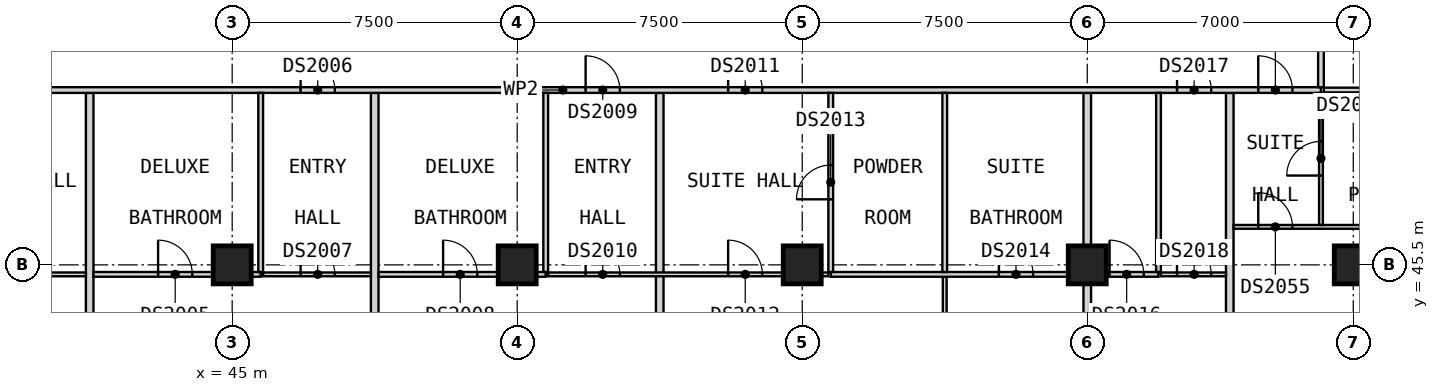
"""IFC4 building model, lengths in metres.
Left out: names, types, materials, properties, quantities, classifications, styles, units other than length and angle.
Written with IfcOpenShell. Run it as: python <this file> out.ifc"""

import sys

from ifc_helpers import new_model, si_unit, direction, frame, frame_2d, origin, origin_2d, place, context, subcontext, project, spatial, rectangle, extrude, element, fill, save


model = new_model("IFC4")
c1 = context("Model", 3, precision=1e-05, world=origin(), true_north=direction((0.0, 1.0)))
c2 = subcontext(c1, "Body", "Model", "MODEL_VIEW")
j1 = project(units=[si_unit("LENGTHUNIT", "METRE"), si_unit("PLANEANGLEUNIT", "RADIAN")], contexts=[c1])
p1 = place(None, origin())
s1 = spatial("IfcSite", under=j1, at=p1, CompositionType="ELEMENT")
p2 = place(p1, origin())
s2 = spatial("IfcBuilding", under=s1, at=p2, CompositionType="ELEMENT")
p3 = place(p2, frame((0.0, 0.0, 133.8)))
s3 = spatial("IfcBuildingStorey", under=s2, at=p3, CompositionType="ELEMENT", Elevation=133.8)
for number, where, z_axis, x_axis in (
    (1, (45.0, 45.5, 0.0), (0.0, 0.0, 1.0), (1.0, 0.0, 0.0)),
    (2, (52.5, 45.5, 0.0), (0.0, 0.0, 1.0), (1.0, 0.0, 0.0)),
    (3, (60.0, 45.5, 0.0), (0.0, 0.0, 1.0), (1.0, 0.0, 0.0)),
    (4, (67.5, 45.5, 0.0), (0.0, 0.0, 1.0), (1.0, 0.0, 0.0)),
    (5, (74.5, 45.5, 0.0), (0.0, 0.0, 1.0), (1.0, 0.0, 0.0)),
):
    element("IfcColumn", number, at=place(p3, frame(where, z_axis=z_axis, x_axis=x_axis)), inside=s3, PredefinedType="COLUMN", context=c2, shape_type="SweptSolid", body=[
        extrude(rectangle(XDim=1.0, YDim=1.0, at=origin_2d()), origin(), (0.0, 0.0, 1.0), 3.6),
    ])
for number, where, z_axis, x_axis in (
    (6, (41.25, 38.31, 0.0), (0.0, 0.0, 1.0), (0.0, 1.0, 0.0)),
    (7, (48.75, 38.31, 0.0), (0.0, 0.0, 1.0), (0.0, 1.0, 0.0)),
    (8, (56.25, 38.31, 0.0), (0.0, 0.0, 1.0), (0.0, 1.0, 0.0)),
):
    element("IfcWall", number, at=place(p3, frame(where, z_axis=z_axis, x_axis=x_axis)), inside=s3, PredefinedType="PARTITIONING", context=c2, shape_type="SweptSolid", body=[
        extrude(rectangle(XDim=11.715, YDim=0.2, at=frame_2d((5.857, 0.0))), origin(), (0.0, 0.0, 1.0), 3.35),
    ])
p4 = place(p3, frame((67.5, 37.5, 0.0), z_axis=(0.0, 0.0, 1.0), x_axis=(0.0, 1.0, 0.0)))
e9 = element("IfcWall", 9, at=p4, inside=s3, PredefinedType="PARTITIONING", context=c2, shape_type="SweptSolid", body=[
    extrude(rectangle(XDim=12.525, YDim=0.2, at=frame_2d((6.262, 0.0))), origin(), (0.0, 0.0, 1.0), 3.35),
])
p5 = place(p3, frame((71.25, 38.31, 0.0), z_axis=(0.0, 0.0, 1.0), x_axis=(0.0, 1.0, 0.0)))
e10 = element("IfcWall", 10, at=p5, inside=s3, PredefinedType="PARTITIONING", context=c2, shape_type="SweptSolid", body=[
    extrude(rectangle(XDim=11.715, YDim=0.2, at=frame_2d((5.857, 0.0))), origin(), (0.0, 0.0, 1.0), 3.35),
])
p6 = place(p3, frame((33.75, 50.1, 0.0), z_axis=(0.0, 0.0, 1.0), x_axis=(1.0, 0.0, 0.0)))
e11 = element("IfcWall", 11, at=p6, inside=s3, PredefinedType="PARTITIONING", context=c2, shape_type="SweptSolid", body=[
    extrude(rectangle(XDim=39.9, YDim=0.15, at=frame_2d((19.95, 0.0))), origin(), (0.0, 0.0, 1.0), 3.35),
])
p7 = place(p6, frame((5.175, 0.0, 0.0)))
e12 = element("IfcOpeningElement", 12, at=p7, cuts=e11, PredefinedType="OPENING", context=c2, shape_type="SweptSolid", body=[
    extrude(rectangle(XDim=0.9, YDim=2.1, at=frame_2d((0.45, 1.05))), frame((0.0, 0.085, 0.0), z_axis=(0.0, -1.0, 0.0), x_axis=(1.0, 0.0, 0.0)), (0.0, 0.0, 1.0), 0.17),
])
p8 = place(p6, frame((13.05, 0.0, 0.0)))
e13 = element("IfcOpeningElement", 13, at=p8, cuts=e11, PredefinedType="OPENING", context=c2, shape_type="SweptSolid", body=[
    extrude(rectangle(XDim=0.9, YDim=2.1, at=frame_2d((0.45, 1.05))), frame((0.0, 0.085, 0.0), z_axis=(0.0, -1.0, 0.0), x_axis=(1.0, 0.0, 0.0)), (0.0, 0.0, 1.0), 0.17),
])
p9 = place(p6, frame((20.55, 0.0, 0.0)))
e14 = element("IfcOpeningElement", 14, at=p9, cuts=e11, PredefinedType="OPENING", context=c2, shape_type="SweptSolid", body=[
    extrude(rectangle(XDim=0.9, YDim=2.1, at=frame_2d((0.45, 1.05))), frame((0.0, 0.085, 0.0), z_axis=(0.0, -1.0, 0.0), x_axis=(1.0, 0.0, 0.0)), (0.0, 0.0, 1.0), 0.17),
])
p10 = place(p6, frame((24.3, 0.0, 0.0)))
e15 = element("IfcOpeningElement", 15, at=p10, cuts=e11, PredefinedType="OPENING", context=c2, shape_type="SweptSolid", body=[
    extrude(rectangle(XDim=0.9, YDim=2.1, at=frame_2d((0.45, 1.05))), frame((0.0, 0.085, 0.0), z_axis=(0.0, -1.0, 0.0), x_axis=(1.0, 0.0, 0.0)), (0.0, 0.0, 1.0), 0.17),
])
p11 = place(p6, frame((36.113, 0.0, 0.0)))
e16 = element("IfcOpeningElement", 16, at=p11, cuts=e11, PredefinedType="OPENING", context=c2, shape_type="SweptSolid", body=[
    extrude(rectangle(XDim=0.9, YDim=2.1, at=frame_2d((0.45, 1.05))), frame((0.0, 0.085, 0.0), z_axis=(0.0, -1.0, 0.0), x_axis=(1.0, 0.0, 0.0)), (0.0, 0.0, 1.0), 0.17),
])
p12 = place(p6, frame((38.25, 0.0, 0.0)))
e17 = element("IfcOpeningElement", 17, at=p12, cuts=e11, PredefinedType="OPENING", context=c2, shape_type="SweptSolid", body=[
    extrude(rectangle(XDim=0.9, YDim=2.1, at=frame_2d((0.45, 1.05))), frame((0.0, 0.085, 0.0), z_axis=(0.0, -1.0, 0.0), x_axis=(1.0, 0.0, 0.0)), (0.0, 0.0, 1.0), 0.17),
])
p13 = place(p3, frame((73.65, 50.175, 0.0), z_axis=(0.0, 0.0, 1.0), x_axis=(0.0, 1.0, 0.0)))
e18 = element("IfcWall", 18, at=p13, inside=s3, PredefinedType="PARTITIONING", context=c2, shape_type="SweptSolid", body=[
    extrude(rectangle(XDim=38.4, YDim=0.15, at=frame_2d((19.2, 0.0))), origin(), (0.0, 0.0, 1.0), 3.35),
])
p14 = place(p13, frame((7.875, 0.0, 0.0)))
e19 = element("IfcOpeningElement", 19, at=p14, cuts=e18, PredefinedType="OPENING", context=c2, shape_type="SweptSolid", body=[
    extrude(rectangle(XDim=0.9, YDim=2.1, at=frame_2d((0.45, 1.05))), frame((0.0, 0.085, 0.0), z_axis=(0.0, -1.0, 0.0), x_axis=(1.0, 0.0, 0.0)), (0.0, 0.0, 1.0), 0.17),
])
p15 = place(p13, frame((12.188, 0.0, 0.0)))
e20 = element("IfcOpeningElement", 20, at=p15, cuts=e18, PredefinedType="OPENING", context=c2, shape_type="SweptSolid", body=[
    extrude(rectangle(XDim=0.9, YDim=2.1, at=frame_2d((0.45, 1.05))), frame((0.0, 0.085, 0.0), z_axis=(0.0, -1.0, 0.0), x_axis=(1.0, 0.0, 0.0)), (0.0, 0.0, 1.0), 0.17),
])
p16 = place(p13, frame((15.375, 0.0, 0.0)))
e21 = element("IfcOpeningElement", 21, at=p16, cuts=e18, PredefinedType="OPENING", context=c2, shape_type="SweptSolid", body=[
    extrude(rectangle(XDim=0.9, YDim=2.1, at=frame_2d((0.45, 1.05))), frame((0.0, 0.085, 0.0), z_axis=(0.0, -1.0, 0.0), x_axis=(1.0, 0.0, 0.0)), (0.0, 0.0, 1.0), 0.17),
])
p17 = place(p13, frame((30.375, 0.0, 0.0)))
e22 = element("IfcOpeningElement", 22, at=p17, cuts=e18, PredefinedType="OPENING", context=c2, shape_type="SweptSolid", body=[
    extrude(rectangle(XDim=0.9, YDim=2.1, at=frame_2d((0.45, 1.05))), frame((0.0, 0.085, 0.0), z_axis=(0.0, -1.0, 0.0), x_axis=(1.0, 0.0, 0.0)), (0.0, 0.0, 1.0), 0.17),
])
p18 = place(p13, frame((34.688, 0.0, 0.0)))
e23 = element("IfcOpeningElement", 23, at=p18, cuts=e18, PredefinedType="OPENING", context=c2, shape_type="SweptSolid", body=[
    extrude(rectangle(XDim=0.9, YDim=2.1, at=frame_2d((0.45, 1.05))), frame((0.0, 0.085, 0.0), z_axis=(0.0, -1.0, 0.0), x_axis=(1.0, 0.0, 0.0)), (0.0, 0.0, 1.0), 0.17),
])
p19 = place(p3, frame((33.812, 45.25, 0.0), z_axis=(0.0, 0.0, 1.0), x_axis=(1.0, 0.0, 0.0)))
e24 = element("IfcWall", 24, at=p19, inside=s3, PredefinedType="PARTITIONING", context=c2, shape_type="SweptSolid", body=[
    extrude(rectangle(XDim=7.337, YDim=0.1, at=frame_2d((3.669, 0.0))), origin(), (0.0, 0.0, 1.0), 3.35),
])
p20 = place(p19, frame((5.113, 0.0, 0.0)))
e25 = element("IfcOpeningElement", 25, at=p20, cuts=e24, PredefinedType="OPENING", context=c2, shape_type="SweptSolid", body=[
    extrude(rectangle(XDim=0.9, YDim=2.1, at=frame_2d((0.45, 1.05))), frame((0.0, 0.06, 0.0), z_axis=(0.0, -1.0, 0.0), x_axis=(1.0, 0.0, 0.0)), (0.0, 0.0, 1.0), 0.12),
])
p21 = place(p3, frame((45.812, 45.25, 0.0), z_axis=(0.0, 0.0, 1.0), x_axis=(1.0, 0.0, 0.0)))
e26 = element("IfcWall", 26, at=p21, inside=s3, PredefinedType="PARTITIONING", context=c2, shape_type="SweptSolid", body=[
    extrude(rectangle(XDim=2.837, YDim=0.1, at=frame_2d((1.419, 0.0))), origin(), (0.0, 0.0, 1.0), 3.35),
])
p22 = place(p21, frame((0.988, 0.0, 0.0)))
e27 = element("IfcOpeningElement", 27, at=p22, cuts=e26, PredefinedType="OPENING", context=c2, shape_type="SweptSolid", body=[
    extrude(rectangle(XDim=0.9, YDim=2.1, at=frame_2d((0.45, 1.05))), frame((0.0, 0.06, 0.0), z_axis=(0.0, -1.0, 0.0), x_axis=(1.0, 0.0, 0.0)), (0.0, 0.0, 1.0), 0.12),
])
p23 = place(p3, frame((53.312, 45.25, 0.0), z_axis=(0.0, 0.0, 1.0), x_axis=(1.0, 0.0, 0.0)))
e28 = element("IfcWall", 28, at=p23, inside=s3, PredefinedType="PARTITIONING", context=c2, shape_type="SweptSolid", body=[
    extrude(rectangle(XDim=7.375, YDim=0.1, at=frame_2d((3.688, 0.0))), origin(), (0.0, 0.0, 1.0), 3.35),
])
p24 = place(p23, frame((0.988, 0.0, 0.0)))
e29 = element("IfcOpeningElement", 29, at=p24, cuts=e28, PredefinedType="OPENING", context=c2, shape_type="SweptSolid", body=[
    extrude(rectangle(XDim=0.9, YDim=2.1, at=frame_2d((0.45, 1.05))), frame((0.0, 0.06, 0.0), z_axis=(0.0, -1.0, 0.0), x_axis=(1.0, 0.0, 0.0)), (0.0, 0.0, 1.0), 0.12),
])
p25 = place(p23, frame((4.738, 0.0, 0.0)))
e30 = element("IfcOpeningElement", 30, at=p25, cuts=e28, PredefinedType="OPENING", context=c2, shape_type="SweptSolid", body=[
    extrude(rectangle(XDim=0.9, YDim=2.1, at=frame_2d((0.45, 1.05))), frame((0.0, 0.06, 0.0), z_axis=(0.0, -1.0, 0.0), x_axis=(1.0, 0.0, 0.0)), (0.0, 0.0, 1.0), 0.12),
])
p26 = place(p3, frame((69.438, 45.25, 0.0), z_axis=(0.0, 0.0, 1.0), x_axis=(1.0, 0.0, 0.0)))
e31 = element("IfcWall", 31, at=p26, inside=s3, PredefinedType="PARTITIONING", context=c2, shape_type="SweptSolid", body=[
    extrude(rectangle(XDim=1.712, YDim=0.1, at=frame_2d((0.856, 0.0))), origin(), (0.0, 0.0, 1.0), 3.35),
])
p27 = place(p26, frame((0.425, 0.0, 0.0)))
e32 = element("IfcOpeningElement", 32, at=p27, cuts=e31, PredefinedType="OPENING", context=c2, shape_type="SweptSolid", body=[
    extrude(rectangle(XDim=0.9, YDim=2.1, at=frame_2d((0.45, 1.05))), frame((0.0, 0.06, 0.0), z_axis=(0.0, -1.0, 0.0), x_axis=(1.0, 0.0, 0.0)), (0.0, 0.0, 1.0), 0.12),
])
p28 = place(p3, frame((71.35, 46.5, 0.0), z_axis=(0.0, 0.0, 1.0), x_axis=(1.0, 0.0, 0.0)))
e33 = element("IfcWall", 33, at=p28, inside=s3, PredefinedType="PARTITIONING", context=c2, shape_type="SweptSolid", body=[
    extrude(rectangle(XDim=7.35, YDim=0.1, at=frame_2d((3.675, 0.0))), origin(), (0.0, 0.0, 1.0), 3.35),
])
p29 = place(p28, frame((0.65, 0.0, 0.0)))
e34 = element("IfcOpeningElement", 34, at=p29, cuts=e33, PredefinedType="OPENING", context=c2, shape_type="SweptSolid", body=[
    extrude(rectangle(XDim=0.9, YDim=2.1, at=frame_2d((0.45, 1.05))), frame((0.0, 0.06, 0.0), z_axis=(0.0, -1.0, 0.0), x_axis=(1.0, 0.0, 0.0)), (0.0, 0.0, 1.0), 0.12),
])
p30 = place(p3, frame((63.75, 38.31, 0.0), z_axis=(0.0, 0.0, 1.0), x_axis=(0.0, 1.0, 0.0)))
e35 = element("IfcWall", 35, at=p30, inside=s3, PredefinedType="PARTITIONING", context=c2, shape_type="SweptSolid", body=[
    extrude(rectangle(XDim=6.877, YDim=0.1, at=frame_2d((3.439, 0.0))), origin(), (0.0, 0.0, 1.0), 3.35),
])
p31 = place(p30, frame((2.615, 0.0, 0.0)))
e36 = element("IfcOpeningElement", 36, at=p31, cuts=e35, PredefinedType="OPENING", context=c2, shape_type="SweptSolid", body=[
    extrude(rectangle(XDim=0.9, YDim=2.1, at=frame_2d((0.45, 1.05))), frame((0.0, 0.06, 0.0), z_axis=(0.0, -1.0, 0.0), x_axis=(1.0, 0.0, 0.0)), (0.0, 0.0, 1.0), 0.12),
])
p32 = place(p3, frame((73.65, 46.55, 0.0), z_axis=(0.0, 0.0, 1.0), x_axis=(0.0, 1.0, 0.0)))
e37 = element("IfcWall", 37, at=p32, inside=s3, PredefinedType="PARTITIONING", context=c2, shape_type="SweptSolid", body=[
    extrude(rectangle(XDim=3.475, YDim=0.1, at=frame_2d((1.737, 0.0))), origin(), (0.0, 0.0, 1.0), 3.35),
])
p33 = place(p32, frame((1.3, 0.0, 0.0)))
e38 = element("IfcOpeningElement", 38, at=p33, cuts=e37, PredefinedType="OPENING", context=c2, shape_type="SweptSolid", body=[
    extrude(rectangle(XDim=0.9, YDim=2.1, at=frame_2d((0.45, 1.05))), frame((0.0, 0.06, 0.0), z_axis=(0.0, -1.0, 0.0), x_axis=(1.0, 0.0, 0.0)), (0.0, 0.0, 1.0), 0.12),
])
p34 = place(p3, frame((41.35, 45.25, 0.0), z_axis=(0.0, 0.0, 1.0), x_axis=(1.0, 0.0, 0.0)))
e39 = element("IfcWall", 39, at=p34, inside=s3, PredefinedType="PARTITIONING", context=c2, shape_type="SweptSolid", body=[
    extrude(rectangle(XDim=4.4, YDim=0.125, at=frame_2d((2.2, 0.0))), origin(), (0.0, 0.0, 1.0), 3.35),
])
p35 = place(p34, frame((1.7, 0.0, 0.0)))
e40 = element("IfcOpeningElement", 40, at=p35, cuts=e39, PredefinedType="OPENING", context=c2, shape_type="SweptSolid", body=[
    extrude(rectangle(XDim=0.9, YDim=2.1, at=frame_2d((0.45, 1.05))), frame((0.0, 0.073, 0.0), z_axis=(0.0, -1.0, 0.0), x_axis=(1.0, 0.0, 0.0)), (0.0, 0.0, 1.0), 0.145),
])
p36 = place(p3, frame((48.85, 45.25, 0.0), z_axis=(0.0, 0.0, 1.0), x_axis=(1.0, 0.0, 0.0)))
e41 = element("IfcWall", 41, at=p36, inside=s3, PredefinedType="PARTITIONING", context=c2, shape_type="SweptSolid", body=[
    extrude(rectangle(XDim=4.4, YDim=0.125, at=frame_2d((2.2, 0.0))), origin(), (0.0, 0.0, 1.0), 3.35),
])
p37 = place(p36, frame((1.7, 0.0, 0.0)))
e42 = element("IfcOpeningElement", 42, at=p37, cuts=e41, PredefinedType="OPENING", context=c2, shape_type="SweptSolid", body=[
    extrude(rectangle(XDim=0.9, YDim=2.1, at=frame_2d((0.45, 1.05))), frame((0.0, 0.073, 0.0), z_axis=(0.0, -1.0, 0.0), x_axis=(1.0, 0.0, 0.0)), (0.0, 0.0, 1.0), 0.145),
])
p38 = place(p3, frame((60.75, 45.25, 0.0), z_axis=(0.0, 0.0, 1.0), x_axis=(1.0, 0.0, 0.0)))
e43 = element("IfcWall", 43, at=p38, inside=s3, PredefinedType="PARTITIONING", context=c2, shape_type="SweptSolid", body=[
    extrude(rectangle(XDim=8.625, YDim=0.125, at=frame_2d((4.312, 0.0))), origin(), (0.0, 0.0, 1.0), 3.35),
])
p39 = place(p38, frame((4.425, 0.0, 0.0)))
e44 = element("IfcOpeningElement", 44, at=p39, cuts=e43, PredefinedType="OPENING", context=c2, shape_type="SweptSolid", body=[
    extrude(rectangle(XDim=0.9, YDim=2.1, at=frame_2d((0.45, 1.05))), frame((0.0, 0.073, 0.0), z_axis=(0.0, -1.0, 0.0), x_axis=(1.0, 0.0, 0.0)), (0.0, 0.0, 1.0), 0.145),
])
p40 = place(p38, frame((7.337, 0.0, 0.0)))
e45 = element("IfcOpeningElement", 45, at=p40, cuts=e43, PredefinedType="OPENING", context=c2, shape_type="SweptSolid", body=[
    extrude(rectangle(XDim=0.9, YDim=2.1, at=frame_2d((0.45, 1.05))), frame((0.0, 0.073, 0.0), z_axis=(0.0, -1.0, 0.0), x_axis=(1.0, 0.0, 0.0)), (0.0, 0.0, 1.0), 0.145),
])
p41 = place(p3, frame((73.725, 50.1, 0.0), z_axis=(0.0, 0.0, 1.0), x_axis=(1.0, 0.0, 0.0)))
e46 = element("IfcWall", 46, at=p41, inside=s3, PredefinedType="PARTITIONING", context=c2, shape_type="SweptSolid", body=[
    extrude(rectangle(XDim=5.025, YDim=0.125, at=frame_2d((2.512, 0.0))), origin(), (0.0, 0.0, 1.0), 3.35),
])
for number, where, z_axis, x_axis in (
    (47, (45.75, 45.312, 0.0), (0.0, 0.0, 1.0), (0.0, 1.0, 0.0)),
    (48, (53.25, 45.312, 0.0), (0.0, 0.0, 1.0), (0.0, 1.0, 0.0)),
):
    element("IfcWall", number, at=place(p3, frame(where, z_axis=z_axis, x_axis=x_axis)), inside=s3, PredefinedType="PARTITIONING", context=c2, shape_type="SweptSolid", body=[
        extrude(rectangle(XDim=4.712, YDim=0.125, at=frame_2d((2.356, 0.0))), origin(), (0.0, 0.0, 1.0), 3.35),
    ])
p42 = place(p3, frame((60.75, 45.312, 0.0), z_axis=(0.0, 0.0, 1.0), x_axis=(0.0, 1.0, 0.0)))
e49 = element("IfcWall", 49, at=p42, inside=s3, PredefinedType="PARTITIONING", context=c2, shape_type="SweptSolid", body=[
    extrude(rectangle(XDim=4.712, YDim=0.125, at=frame_2d((2.356, 0.0))), origin(), (0.0, 0.0, 1.0), 3.35),
])
p43 = place(p42, frame((1.913, 0.0, 0.0)))
e50 = element("IfcOpeningElement", 50, at=p43, cuts=e49, PredefinedType="OPENING", context=c2, shape_type="SweptSolid", body=[
    extrude(rectangle(XDim=0.9, YDim=2.1, at=frame_2d((0.45, 1.05))), frame((0.0, 0.073, 0.0), z_axis=(0.0, -1.0, 0.0), x_axis=(1.0, 0.0, 0.0)), (0.0, 0.0, 1.0), 0.145),
])
for number, where, z_axis, x_axis in (
    (51, (63.75, 45.312, 0.0), (0.0, 0.0, 1.0), (0.0, 1.0, 0.0)),
    (52, (69.375, 45.312, 0.0), (0.0, 0.0, 1.0), (0.0, 1.0, 0.0)),
):
    element("IfcWall", number, at=place(p3, frame(where, z_axis=z_axis, x_axis=x_axis)), inside=s3, PredefinedType="PARTITIONING", context=c2, shape_type="SweptSolid", body=[
        extrude(rectangle(XDim=4.712, YDim=0.125, at=frame_2d((2.356, 0.0))), origin(), (0.0, 0.0, 1.0), 3.35),
    ])
p44 = place(p35, origin())
e53 = element("IfcDoor", 53, at=p44, inside=s3, OperationType="SINGLE_SWING_LEFT", PredefinedType="DOOR", context=c2, shape_type="SweptSolid", body=[
    extrude(rectangle(XDim=0.9, YDim=2.1, at=frame_2d((0.45, 1.05))), frame((0.0, 0.025, 0.0), z_axis=(0.0, -1.0, 0.0), x_axis=(1.0, 0.0, 0.0)), (0.0, 0.0, 1.0), 0.05),
])
fill(e40, e53)
p45 = place(p8, origin())
e54 = element("IfcDoor", 54, at=p45, inside=s3, OperationType="SINGLE_SWING_RIGHT", PredefinedType="DOOR", context=c2, shape_type="SweptSolid", body=[
    extrude(rectangle(XDim=0.9, YDim=2.1, at=frame_2d((0.45, 1.05))), frame((0.0, 0.025, 0.0), z_axis=(0.0, -1.0, 0.0), x_axis=(1.0, 0.0, 0.0)), (0.0, 0.0, 1.0), 0.05),
])
fill(e13, e54)
p46 = place(p22, origin())
e55 = element("IfcDoor", 55, at=p46, inside=s3, OperationType="SINGLE_SWING_LEFT", PredefinedType="DOOR", context=c2, shape_type="SweptSolid", body=[
    extrude(rectangle(XDim=0.9, YDim=2.1, at=frame_2d((0.45, 1.05))), frame((0.0, 0.025, 0.0), z_axis=(0.0, -1.0, 0.0), x_axis=(1.0, 0.0, 0.0)), (0.0, 0.0, 1.0), 0.05),
])
fill(e27, e55)
p47 = place(p37, origin())
e56 = element("IfcDoor", 56, at=p47, inside=s3, OperationType="SINGLE_SWING_LEFT", PredefinedType="DOOR", context=c2, shape_type="SweptSolid", body=[
    extrude(rectangle(XDim=0.9, YDim=2.1, at=frame_2d((0.45, 1.05))), frame((0.0, 0.025, 0.0), z_axis=(0.0, -1.0, 0.0), x_axis=(1.0, 0.0, 0.0)), (0.0, 0.0, 1.0), 0.05),
])
fill(e42, e56)
p48 = place(p9, origin())
e57 = element("IfcDoor", 57, at=p48, inside=s3, OperationType="SINGLE_SWING_RIGHT", PredefinedType="DOOR", context=c2, shape_type="SweptSolid", body=[
    extrude(rectangle(XDim=0.9, YDim=2.1, at=frame_2d((0.45, 1.05))), frame((0.0, 0.025, 0.0), z_axis=(0.0, -1.0, 0.0), x_axis=(1.0, 0.0, 0.0)), (0.0, 0.0, 1.0), 0.05),
])
fill(e14, e57)
p49 = place(p24, origin())
e58 = element("IfcDoor", 58, at=p49, inside=s3, OperationType="SINGLE_SWING_LEFT", PredefinedType="DOOR", context=c2, shape_type="SweptSolid", body=[
    extrude(rectangle(XDim=0.9, YDim=2.1, at=frame_2d((0.45, 1.05))), frame((0.0, 0.025, 0.0), z_axis=(0.0, -1.0, 0.0), x_axis=(1.0, 0.0, 0.0)), (0.0, 0.0, 1.0), 0.05),
])
fill(e29, e58)
p50 = place(p10, origin())
e59 = element("IfcDoor", 59, at=p50, inside=s3, OperationType="SINGLE_SWING_RIGHT", PredefinedType="DOOR", context=c2, shape_type="SweptSolid", body=[
    extrude(rectangle(XDim=0.9, YDim=2.1, at=frame_2d((0.45, 1.05))), frame((0.0, 0.025, 0.0), z_axis=(0.0, -1.0, 0.0), x_axis=(1.0, 0.0, 0.0)), (0.0, 0.0, 1.0), 0.05),
])
fill(e15, e59)
p51 = place(p25, origin())
e60 = element("IfcDoor", 60, at=p51, inside=s3, OperationType="SINGLE_SWING_LEFT", PredefinedType="DOOR", context=c2, shape_type="SweptSolid", body=[
    extrude(rectangle(XDim=0.9, YDim=2.1, at=frame_2d((0.45, 1.05))), frame((0.0, 0.025, 0.0), z_axis=(0.0, -1.0, 0.0), x_axis=(1.0, 0.0, 0.0)), (0.0, 0.0, 1.0), 0.05),
])
fill(e30, e60)
p52 = place(p43, origin())
e61 = element("IfcDoor", 61, at=p52, inside=s3, OperationType="SINGLE_SWING_LEFT", PredefinedType="DOOR", context=c2, shape_type="SweptSolid", body=[
    extrude(rectangle(XDim=0.9, YDim=2.1, at=frame_2d((0.45, 1.05))), frame((0.0, 0.025, 0.0), z_axis=(0.0, -1.0, 0.0), x_axis=(1.0, 0.0, 0.0)), (0.0, 0.0, 1.0), 0.05),
])
fill(e50, e61)
p53 = place(p39, origin())
e62 = element("IfcDoor", 62, at=p53, inside=s3, OperationType="SINGLE_SWING_LEFT", PredefinedType="DOOR", context=c2, shape_type="SweptSolid", body=[
    extrude(rectangle(XDim=0.9, YDim=2.1, at=frame_2d((0.45, 1.05))), frame((0.0, 0.025, 0.0), z_axis=(0.0, -1.0, 0.0), x_axis=(1.0, 0.0, 0.0)), (0.0, 0.0, 1.0), 0.05),
])
fill(e44, e62)
p54 = place(p40, origin())
e63 = element("IfcDoor", 63, at=p54, inside=s3, OperationType="SINGLE_SWING_RIGHT", PredefinedType="DOOR", context=c2, shape_type="SweptSolid", body=[
    extrude(rectangle(XDim=0.9, YDim=2.1, at=frame_2d((0.45, 1.05))), frame((0.0, 0.025, 0.0), z_axis=(0.0, -1.0, 0.0), x_axis=(1.0, 0.0, 0.0)), (0.0, 0.0, 1.0), 0.05),
])
fill(e45, e63)
p55 = place(p11, origin())
e64 = element("IfcDoor", 64, at=p55, inside=s3, OperationType="SINGLE_SWING_RIGHT", PredefinedType="DOOR", context=c2, shape_type="SweptSolid", body=[
    extrude(rectangle(XDim=0.9, YDim=2.1, at=frame_2d((0.45, 1.05))), frame((0.0, 0.025, 0.0), z_axis=(0.0, -1.0, 0.0), x_axis=(1.0, 0.0, 0.0)), (0.0, 0.0, 1.0), 0.05),
])
fill(e16, e64)
p56 = place(p27, origin())
e65 = element("IfcDoor", 65, at=p56, inside=s3, OperationType="SINGLE_SWING_LEFT", PredefinedType="DOOR", context=c2, shape_type="SweptSolid", body=[
    extrude(rectangle(XDim=0.9, YDim=2.1, at=frame_2d((0.45, 1.05))), frame((0.0, 0.025, 0.0), z_axis=(0.0, -1.0, 0.0), x_axis=(1.0, 0.0, 0.0)), (0.0, 0.0, 1.0), 0.05),
])
fill(e32, e65)
p57 = place(p12, origin())
e66 = element("IfcDoor", 66, at=p57, inside=s3, OperationType="SINGLE_SWING_LEFT", PredefinedType="DOOR", context=c2, shape_type="SweptSolid", body=[
    extrude(rectangle(XDim=0.9, YDim=2.1, at=frame_2d((0.45, 1.05))), frame((0.0, 0.025, 0.0), z_axis=(0.0, -1.0, 0.0), x_axis=(1.0, 0.0, 0.0)), (0.0, 0.0, 1.0), 0.05),
])
fill(e17, e66)
p58 = place(p29, origin())
e67 = element("IfcDoor", 67, at=p58, inside=s3, OperationType="SINGLE_SWING_RIGHT", PredefinedType="DOOR", context=c2, shape_type="SweptSolid", body=[
    extrude(rectangle(XDim=0.9, YDim=2.1, at=frame_2d((0.45, 1.05))), frame((0.0, 0.025, 0.0), z_axis=(0.0, -1.0, 0.0), x_axis=(1.0, 0.0, 0.0)), (0.0, 0.0, 1.0), 0.05),
])
fill(e34, e67)
p59 = place(p33, origin())
e68 = element("IfcDoor", 68, at=p59, inside=s3, OperationType="SINGLE_SWING_RIGHT", PredefinedType="DOOR", context=c2, shape_type="SweptSolid", body=[
    extrude(rectangle(XDim=0.9, YDim=2.1, at=frame_2d((0.45, 1.05))), frame((0.0, 0.025, 0.0), z_axis=(0.0, -1.0, 0.0), x_axis=(1.0, 0.0, 0.0)), (0.0, 0.0, 1.0), 0.05),
])
fill(e38, e68)
save(model, sys.argv[1])
